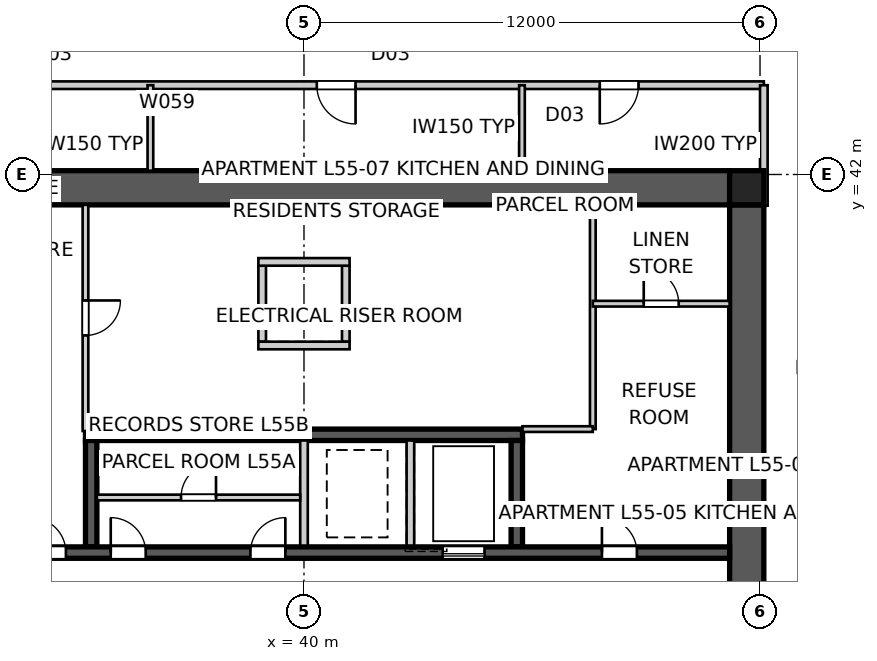
"""IFC4 building model, lengths in metres.
Left out: names, types, materials, properties, quantities, classifications, styles, units other than length and angle.
Written with IfcOpenShell. Run it as: python <this file> out.ifc"""

import sys

from ifc_helpers import new_model, si_unit, direction, frame, frame_2d, origin, origin_2d, place, context, subcontext, project, spatial, polyline, rectangle, outline, extrude, element, fill, save


model = new_model("IFC4")
c1 = context("Model", 3, precision=1e-05, world=origin(), true_north=direction((0.0, 1.0)))
c2 = subcontext(c1, "Body", "Model", "MODEL_VIEW")
j1 = project(units=[si_unit("LENGTHUNIT", "METRE"), si_unit("PLANEANGLEUNIT", "RADIAN")], contexts=[c1])
p1 = place(None, origin())
s1 = spatial("IfcSite", under=j1, at=p1, CompositionType="ELEMENT")
p2 = place(p1, origin())
s2 = spatial("IfcBuilding", under=s1, at=p2, CompositionType="ELEMENT")
p3 = place(p2, frame((0.0, 0.0, 199.8)))
s3 = spatial("IfcBuildingStorey", under=s2, at=p3, CompositionType="ELEMENT", Elevation=199.8)
p4 = place(p3, frame((28.8, 41.65, 0.0), z_axis=(0.0, 0.0, 1.0), x_axis=(1.0, 0.0, 0.0)))
e1 = element("IfcWall", 1, at=p4, inside=s3, PredefinedType="SHEAR", context=c2, shape_type="SweptSolid", body=[
    extrude(outline(polyline([(0.0, -0.45), (22.4, -0.45), (22.4, -0.025), (22.85, -0.025), (22.85, 0.025), (22.4, 0.025), (22.4, 0.45), (0.0, 0.45), (0.0, 0.025), (-0.45, 0.025), (-0.45, -0.025), (0.0, -0.025), (0.0, -0.45)])), origin(), (0.0, 0.0, 1.0), 3.4),
])
p5 = place(p3, frame((51.65, 18.8, 0.0), z_axis=(0.0, 0.0, 1.0), x_axis=(0.0, 1.0, 0.0)))
e2 = element("IfcWall", 2, at=p5, inside=s3, PredefinedType="SHEAR", context=c2, shape_type="SweptSolid", body=[
    extrude(outline(polyline([(0.0, -0.45), (22.4, -0.45), (22.4, -0.025), (22.85, -0.025), (22.85, 0.025), (22.4, 0.025), (22.4, 0.45), (0.0, 0.45), (0.0, 0.025), (-0.45, 0.025), (-0.45, -0.025), (0.0, -0.025), (0.0, -0.45)])), origin(), (0.0, 0.0, 1.0), 3.4),
])
p6 = place(p5, frame((11.14, 0.0, 0.0)))
e3 = element("IfcOpeningElement", 3, at=p6, cuts=e2, PredefinedType="OPENING", context=c2, shape_type="SweptSolid", body=[
    extrude(rectangle(XDim=1.02, YDim=2.4, at=frame_2d((0.51, 1.2))), frame((0.0, 0.46, 0.0), z_axis=(0.0, -1.0, 0.0), x_axis=(1.0, 0.0, 0.0)), (0.0, 0.0, 1.0), 0.92),
])
p7 = place(p3, frame((28.8, 32.05, 0.0), z_axis=(0.0, 0.0, 1.0), x_axis=(1.0, 0.0, 0.0)))
e4 = element("IfcWall", 4, at=p7, inside=s3, PredefinedType="SHEAR", context=c2, shape_type="SweptSolid", body=[
    extrude(rectangle(XDim=22.4, YDim=0.3, at=frame_2d((11.2, 0.0))), origin(), (0.0, 0.0, 1.0), 3.4),
])
p8 = place(p7, frame((19.04, 0.0, 0.0)))
e5 = element("IfcOpeningElement", 5, at=p8, cuts=e4, PredefinedType="OPENING", context=c2, shape_type="SweptSolid", body=[
    extrude(rectangle(XDim=0.92, YDim=2.1, at=frame_2d((0.46, 1.05))), frame((0.0, 0.16, 0.0), z_axis=(0.0, -1.0, 0.0), x_axis=(1.0, 0.0, 0.0)), (0.0, 0.0, 1.0), 0.32),
])
p9 = place(p7, frame((1.265, 0.0, 0.0)))
e6 = element("IfcOpeningElement", 6, at=p9, cuts=e4, PredefinedType="OPENING", context=c2, shape_type="SweptSolid", body=[
    extrude(rectangle(XDim=1.02, YDim=2.1, at=frame_2d((0.51, 1.05))), frame((0.0, 0.16, 0.0), z_axis=(0.0, -1.0, 0.0), x_axis=(1.0, 0.0, 0.0)), (0.0, 0.0, 1.0), 0.32),
])
p10 = place(p7, frame((4.015, 0.0, 0.0)))
e7 = element("IfcOpeningElement", 7, at=p10, cuts=e4, PredefinedType="OPENING", context=c2, shape_type="SweptSolid", body=[
    extrude(rectangle(XDim=0.92, YDim=2.1, at=frame_2d((0.46, 1.05))), frame((0.0, 0.16, 0.0), z_axis=(0.0, -1.0, 0.0), x_axis=(1.0, 0.0, 0.0)), (0.0, 0.0, 1.0), 0.32),
])
p11 = place(p7, frame((6.115, 0.0, 0.0)))
e8 = element("IfcOpeningElement", 8, at=p11, cuts=e4, PredefinedType="OPENING", context=c2, shape_type="SweptSolid", body=[
    extrude(rectangle(XDim=0.92, YDim=2.1, at=frame_2d((0.46, 1.05))), frame((0.0, 0.16, 0.0), z_axis=(0.0, -1.0, 0.0), x_axis=(1.0, 0.0, 0.0)), (0.0, 0.0, 1.0), 0.32),
])
p12 = place(p7, frame((9.79, 0.0, 0.0)))
e9 = element("IfcOpeningElement", 9, at=p12, cuts=e4, PredefinedType="OPENING", context=c2, shape_type="SweptSolid", body=[
    extrude(rectangle(XDim=0.92, YDim=2.1, at=frame_2d((0.46, 1.05))), frame((0.0, 0.16, 0.0), z_axis=(0.0, -1.0, 0.0), x_axis=(1.0, 0.0, 0.0)), (0.0, 0.0, 1.0), 0.32),
])
p13 = place(p7, frame((14.85, 0.0, 0.0)))
e10 = element("IfcOpeningElement", 10, at=p13, cuts=e4, PredefinedType="OPENING", context=c2, shape_type="SweptSolid", body=[
    extrude(rectangle(XDim=1.1, YDim=2.1, at=frame_2d((0.55, 1.05))), frame((0.0, 0.16, 0.0), z_axis=(0.0, -1.0, 0.0), x_axis=(1.0, 0.0, 0.0)), (0.0, 0.0, 1.0), 0.32),
])
p14 = place(p3, frame((34.25, 35.15, 0.0), z_axis=(0.0, 0.0, 1.0), x_axis=(1.0, 0.0, 0.0)))
e11 = element("IfcWall", 11, at=p14, inside=s3, PredefinedType="SHEAR", context=c2, shape_type="SweptSolid", body=[
    extrude(rectangle(XDim=11.5, YDim=0.3, at=frame_2d((5.75, 0.0))), origin(), (0.0, 0.0, 1.0), 3.4),
])
p15 = place(p3, frame((34.4, 32.2, 0.0), z_axis=(0.0, 0.0, 1.0), x_axis=(0.0, 1.0, 0.0)))
e12 = element("IfcWall", 12, at=p15, inside=s3, PredefinedType="SHEAR", context=c2, shape_type="SweptSolid", body=[
    extrude(rectangle(XDim=2.8, YDim=0.3, at=frame_2d((1.4, 0.0))), origin(), (0.0, 0.0, 1.0), 3.4),
])
for number, where, z_axis, x_axis in (
    (13, (40.0, 32.2, 0.0), (0.0, 0.0, 1.0), (0.0, 1.0, 0.0)),
    (14, (42.8, 32.2, 0.0), (0.0, 0.0, 1.0), (0.0, 1.0, 0.0)),
):
    element("IfcWall", number, at=place(p3, frame(where, z_axis=z_axis, x_axis=x_axis)), inside=s3, PredefinedType="SOLIDWALL", context=c2, shape_type="SweptSolid", body=[
        extrude(rectangle(XDim=2.8, YDim=0.2, at=frame_2d((1.4, 0.0))), origin(), (0.0, 0.0, 1.0), 3.4),
    ])
p16 = place(p3, frame((45.6, 32.2, 0.0), z_axis=(0.0, 0.0, 1.0), x_axis=(0.0, 1.0, 0.0)))
e15 = element("IfcWall", 15, at=p16, inside=s3, PredefinedType="SHEAR", context=c2, shape_type="SweptSolid", body=[
    extrude(rectangle(XDim=2.8, YDim=0.3, at=frame_2d((1.4, 0.0))), origin(), (0.0, 0.0, 1.0), 3.4),
])
for number, where, z_axis, x_axis in (
    (16, (38.9, 37.6, 0.0), (0.0, 0.0, 1.0), (0.0, 1.0, 0.0)),
    (17, (41.1, 37.6, 0.0), (0.0, 0.0, 1.0), (0.0, 1.0, 0.0)),
):
    element("IfcWall", number, at=place(p3, frame(where, z_axis=z_axis, x_axis=x_axis)), inside=s3, PredefinedType="SOLIDWALL", context=c2, shape_type="SweptSolid", body=[
        extrude(rectangle(XDim=2.0, YDim=0.2, at=frame_2d((1.0, 0.0))), origin(), (0.0, 0.0, 1.0), 3.4),
    ])
for number, where, z_axis, x_axis in (
    (18, (38.8, 37.5, 0.0), (0.0, 0.0, 1.0), (1.0, 0.0, 0.0)),
    (19, (38.8, 39.7, 0.0), (0.0, 0.0, 1.0), (1.0, 0.0, 0.0)),
):
    element("IfcWall", number, at=place(p3, frame(where, z_axis=z_axis, x_axis=x_axis)), inside=s3, PredefinedType="SOLIDWALL", context=c2, shape_type="SweptSolid", body=[
        extrude(rectangle(XDim=2.4, YDim=0.2, at=frame_2d((1.2, 0.0))), origin(), (0.0, 0.0, 1.0), 3.4),
    ])
p17 = place(p3, frame((51.65, 41.65, 0.0), z_axis=(0.0, 0.0, 1.0), x_axis=(1.0, 0.0, 0.0)))
e20 = element("IfcColumn", 20, at=p17, inside=s3, PredefinedType="COLUMN", context=c2, shape_type="SweptSolid", body=[
    extrude(rectangle(XDim=0.9, YDim=0.9, at=origin_2d()), origin(), (0.0, 0.0, 1.0), 3.4),
])
p18 = place(p3, frame((34.25, 41.2, 0.0), z_axis=(0.0, 0.0, 1.0), x_axis=(0.0, -1.0, 0.0)))
e21 = element("IfcWall", 21, at=p18, inside=s3, PredefinedType="SOLIDWALL", context=c2, shape_type="SweptSolid", body=[
    extrude(rectangle(XDim=5.95, YDim=0.15, at=frame_2d((2.975, 0.0))), origin(), (0.0, 0.0, 1.0), 3.2),
])
p19 = place(p18, frame((2.515, 0.0, 0.0)))
e22 = element("IfcOpeningElement", 22, at=p19, cuts=e21, PredefinedType="OPENING", context=c2, shape_type="SweptSolid", body=[
    extrude(rectangle(XDim=0.92, YDim=2.1, at=frame_2d((0.46, 1.05))), frame((0.0, 0.085, 0.0), z_axis=(0.0, -1.0, 0.0), x_axis=(1.0, 0.0, 0.0)), (0.0, 0.0, 1.0), 0.17),
])
p20 = place(p3, frame((47.6, 41.2, 0.0), z_axis=(0.0, 0.0, 1.0), x_axis=(0.0, -1.0, 0.0)))
e23 = element("IfcWall", 23, at=p20, inside=s3, PredefinedType="SOLIDWALL", context=c2, shape_type="SweptSolid", body=[
    extrude(rectangle(XDim=5.9, YDim=0.15, at=frame_2d((2.95, 0.0))), origin(), (0.0, 0.0, 1.0), 3.2),
])
p21 = place(p3, frame((47.6, 35.3, 0.0), z_axis=(0.0, 0.0, 1.0), x_axis=(-1.0, 0.0, 0.0)))
e24 = element("IfcWall", 24, at=p21, inside=s3, PredefinedType="SOLIDWALL", context=c2, shape_type="SweptSolid", body=[
    extrude(rectangle(XDim=1.85, YDim=0.15, at=frame_2d((0.925, 0.0))), origin(), (0.0, 0.0, 1.0), 3.2),
])
p22 = place(p3, frame((47.6, 38.6, 0.0), z_axis=(0.0, 0.0, 1.0), x_axis=(1.0, 0.0, 0.0)))
e25 = element("IfcWall", 25, at=p22, inside=s3, PredefinedType="SOLIDWALL", context=c2, shape_type="SweptSolid", body=[
    extrude(rectangle(XDim=3.6, YDim=0.15, at=frame_2d((1.8, 0.0))), origin(), (0.0, 0.0, 1.0), 3.2),
])
p23 = place(p22, frame((1.34, 0.0, 0.0)))
e26 = element("IfcOpeningElement", 26, at=p23, cuts=e25, PredefinedType="OPENING", context=c2, shape_type="SweptSolid", body=[
    extrude(rectangle(XDim=0.92, YDim=2.1, at=frame_2d((0.46, 1.05))), frame((0.0, 0.085, 0.0), z_axis=(0.0, -1.0, 0.0), x_axis=(1.0, 0.0, 0.0)), (0.0, 0.0, 1.0), 0.17),
])
p24 = place(p3, frame((52.1, 44.35, 0.0), z_axis=(0.0, 0.0, 1.0), x_axis=(-1.0, 0.0, 0.0)))
e27 = element("IfcWall", 27, at=p24, inside=s3, PredefinedType="PARTITIONING", context=c2, shape_type="SweptSolid", body=[
    extrude(rectangle(XDim=24.2, YDim=0.2, at=frame_2d((12.1, 0.0))), origin(), (0.0, 0.0, 1.0), 3.2),
])
p25 = place(p24, frame((10.743, 0.0, 0.0)))
e28 = element("IfcOpeningElement", 28, at=p25, cuts=e27, PredefinedType="OPENING", context=c2, shape_type="SweptSolid", body=[
    extrude(rectangle(XDim=1.02, YDim=2.1, at=frame_2d((0.51, 1.05))), frame((0.0, 0.11, 0.0), z_axis=(0.0, -1.0, 0.0), x_axis=(1.0, 0.0, 0.0)), (0.0, 0.0, 1.0), 0.22),
])
p26 = place(p24, frame((19.636, 0.0, 0.0)))
e29 = element("IfcOpeningElement", 29, at=p26, cuts=e27, PredefinedType="OPENING", context=c2, shape_type="SweptSolid", body=[
    extrude(rectangle(XDim=1.02, YDim=2.1, at=frame_2d((0.51, 1.05))), frame((0.0, 0.11, 0.0), z_axis=(0.0, -1.0, 0.0), x_axis=(1.0, 0.0, 0.0)), (0.0, 0.0, 1.0), 0.22),
])
p27 = place(p24, frame((3.297, 0.0, 0.0)))
e30 = element("IfcOpeningElement", 30, at=p27, cuts=e27, PredefinedType="OPENING", context=c2, shape_type="SweptSolid", body=[
    extrude(rectangle(XDim=1.02, YDim=2.1, at=frame_2d((0.51, 1.05))), frame((0.0, 0.11, 0.0), z_axis=(0.0, -1.0, 0.0), x_axis=(1.0, 0.0, 0.0)), (0.0, 0.0, 1.0), 0.22),
])
p28 = place(p3, frame((52.1, 41.18, 0.0), z_axis=(0.0, 0.0, 1.0), x_axis=(0.0, 1.0, 0.0)))
e31 = element("IfcWall", 31, at=p28, inside=s3, PredefinedType="PARTITIONING", context=c2, shape_type="SweptSolid", body=[
    extrude(rectangle(XDim=3.17, YDim=0.2, at=frame_2d((1.585, 0.0))), origin(), (0.0, 0.0, 1.0), 3.2),
])
p29 = place(p3, frame((35.958, 42.1, 0.0), z_axis=(0.0, 0.0, 1.0), x_axis=(0.0, 1.0, 0.0)))
e32 = element("IfcWall", 32, at=p29, inside=s3, PredefinedType="SOLIDWALL", context=c2, shape_type="SweptSolid", body=[
    extrude(rectangle(XDim=2.25, YDim=0.15, at=frame_2d((1.125, 0.0))), origin(), (0.0, 0.0, 1.0), 3.2),
])
p30 = place(p3, frame((45.735, 42.1, 0.0), z_axis=(0.0, 0.0, 1.0), x_axis=(0.0, 1.0, 0.0)))
e33 = element("IfcWall", 33, at=p30, inside=s3, PredefinedType="SOLIDWALL", context=c2, shape_type="SweptSolid", body=[
    extrude(rectangle(XDim=2.25, YDim=0.15, at=frame_2d((1.125, 0.0))), origin(), (0.0, 0.0, 1.0), 2.671),
])
p31 = place(p3, frame((34.55, 33.5, 0.0), z_axis=(0.0, 0.0, 1.0), x_axis=(1.0, 0.0, 0.0)))
e34 = element("IfcWall", 34, at=p31, inside=s3, PredefinedType="SOLIDWALL", context=c2, shape_type="SweptSolid", body=[
    extrude(rectangle(XDim=5.35, YDim=0.15, at=frame_2d((2.675, 0.0))), origin(), (0.0, 0.0, 1.0), 3.2),
])
p32 = place(p31, frame((2.215, 0.0, 0.0)))
e35 = element("IfcOpeningElement", 35, at=p32, cuts=e34, PredefinedType="OPENING", context=c2, shape_type="SweptSolid", body=[
    extrude(rectangle(XDim=0.92, YDim=2.1, at=frame_2d((0.46, 1.05))), frame((0.0, 0.085, 0.0), z_axis=(0.0, -1.0, 0.0), x_axis=(1.0, 0.0, 0.0)), (0.0, 0.0, 1.0), 0.17),
])
p33 = place(p8, origin())
e36 = element("IfcDoor", 36, at=p33, inside=s3, OperationType="SINGLE_SWING_LEFT", PredefinedType="DOOR", context=c2, shape_type="SweptSolid", body=[
    extrude(rectangle(XDim=0.92, YDim=2.1, at=frame_2d((0.46, 1.05))), frame((0.0, 0.025, 0.0), z_axis=(0.0, -1.0, 0.0), x_axis=(1.0, 0.0, 0.0)), (0.0, 0.0, 1.0), 0.05),
])
fill(e5, e36)
p34 = place(p10, origin())
e37 = element("IfcDoor", 37, at=p34, inside=s3, OperationType="SINGLE_SWING_LEFT", PredefinedType="DOOR", context=c2, shape_type="SweptSolid", body=[
    extrude(rectangle(XDim=0.92, YDim=2.1, at=frame_2d((0.46, 1.05))), frame((0.0, 0.025, 0.0), z_axis=(0.0, -1.0, 0.0), x_axis=(1.0, 0.0, 0.0)), (0.0, 0.0, 1.0), 0.05),
])
fill(e7, e37)
p35 = place(p25, origin())
e38 = element("IfcDoor", 38, at=p35, inside=s3, OperationType="SINGLE_SWING_LEFT", PredefinedType="DOOR", context=c2, shape_type="SweptSolid", body=[
    extrude(rectangle(XDim=1.02, YDim=2.1, at=frame_2d((0.51, 1.05))), frame((0.0, 0.025, 0.0), z_axis=(0.0, -1.0, 0.0), x_axis=(1.0, 0.0, 0.0)), (0.0, 0.0, 1.0), 0.05),
])
fill(e28, e38)
p36 = place(p27, origin())
e39 = element("IfcDoor", 39, at=p36, inside=s3, OperationType="SINGLE_SWING_RIGHT", PredefinedType="DOOR", context=c2, shape_type="SweptSolid", body=[
    extrude(rectangle(XDim=1.02, YDim=2.1, at=frame_2d((0.51, 1.05))), frame((0.0, 0.025, 0.0), z_axis=(0.0, -1.0, 0.0), x_axis=(1.0, 0.0, 0.0)), (0.0, 0.0, 1.0), 0.05),
])
fill(e30, e39)
p37 = place(p23, origin())
e40 = element("IfcDoor", 40, at=p37, inside=s3, OperationType="SINGLE_SWING_LEFT", PredefinedType="DOOR", context=c2, shape_type="SweptSolid", body=[
    extrude(rectangle(XDim=0.92, YDim=2.1, at=frame_2d((0.46, 1.05))), frame((0.0, 0.025, 0.0), z_axis=(0.0, -1.0, 0.0), x_axis=(1.0, 0.0, 0.0)), (0.0, 0.0, 1.0), 0.05),
])
fill(e26, e40)
p38 = place(p19, origin())
e41 = element("IfcDoor", 41, at=p38, inside=s3, OperationType="SINGLE_SWING_LEFT", PredefinedType="DOOR", context=c2, shape_type="SweptSolid", body=[
    extrude(rectangle(XDim=0.92, YDim=2.1, at=frame_2d((0.46, 1.05))), frame((0.0, 0.025, 0.0), z_axis=(0.0, -1.0, 0.0), x_axis=(1.0, 0.0, 0.0)), (0.0, 0.0, 1.0), 0.05),
])
fill(e22, e41)
p39 = place(p11, origin())
e42 = element("IfcDoor", 42, at=p39, inside=s3, OperationType="SINGLE_SWING_LEFT", PredefinedType="DOOR", context=c2, shape_type="SweptSolid", body=[
    extrude(rectangle(XDim=0.92, YDim=2.1, at=frame_2d((0.46, 1.05))), frame((0.0, 0.025, 0.0), z_axis=(0.0, -1.0, 0.0), x_axis=(1.0, 0.0, 0.0)), (0.0, 0.0, 1.0), 0.05),
])
fill(e8, e42)
p40 = place(p12, origin())
e43 = element("IfcDoor", 43, at=p40, inside=s3, OperationType="SINGLE_SWING_RIGHT", PredefinedType="DOOR", context=c2, shape_type="SweptSolid", body=[
    extrude(rectangle(XDim=0.92, YDim=2.1, at=frame_2d((0.46, 1.05))), frame((0.0, 0.025, 0.0), z_axis=(0.0, -1.0, 0.0), x_axis=(1.0, 0.0, 0.0)), (0.0, 0.0, 1.0), 0.05),
])
fill(e9, e43)
p41 = place(p32, origin())
e44 = element("IfcDoor", 44, at=p41, inside=s3, OperationType="SINGLE_SWING_RIGHT", PredefinedType="DOOR", context=c2, shape_type="SweptSolid", body=[
    extrude(rectangle(XDim=0.92, YDim=2.1, at=frame_2d((0.46, 1.05))), frame((0.0, 0.025, 0.0), z_axis=(0.0, -1.0, 0.0), x_axis=(1.0, 0.0, 0.0)), (0.0, 0.0, 1.0), 0.05),
])
fill(e35, e44)
p42 = place(p13, origin())
e45 = element("IfcDoor", 45, at=p42, inside=s3, OperationType="SLIDING_TO_LEFT", PredefinedType="DOOR", context=c2, shape_type="SweptSolid", body=[
    extrude(rectangle(XDim=1.1, YDim=2.1, at=frame_2d((0.55, 1.05))), frame((0.0, 0.025, 0.0), z_axis=(0.0, -1.0, 0.0), x_axis=(1.0, 0.0, 0.0)), (0.0, 0.0, 1.0), 0.05),
])
fill(e10, e45)
save(model, sys.argv[1])
